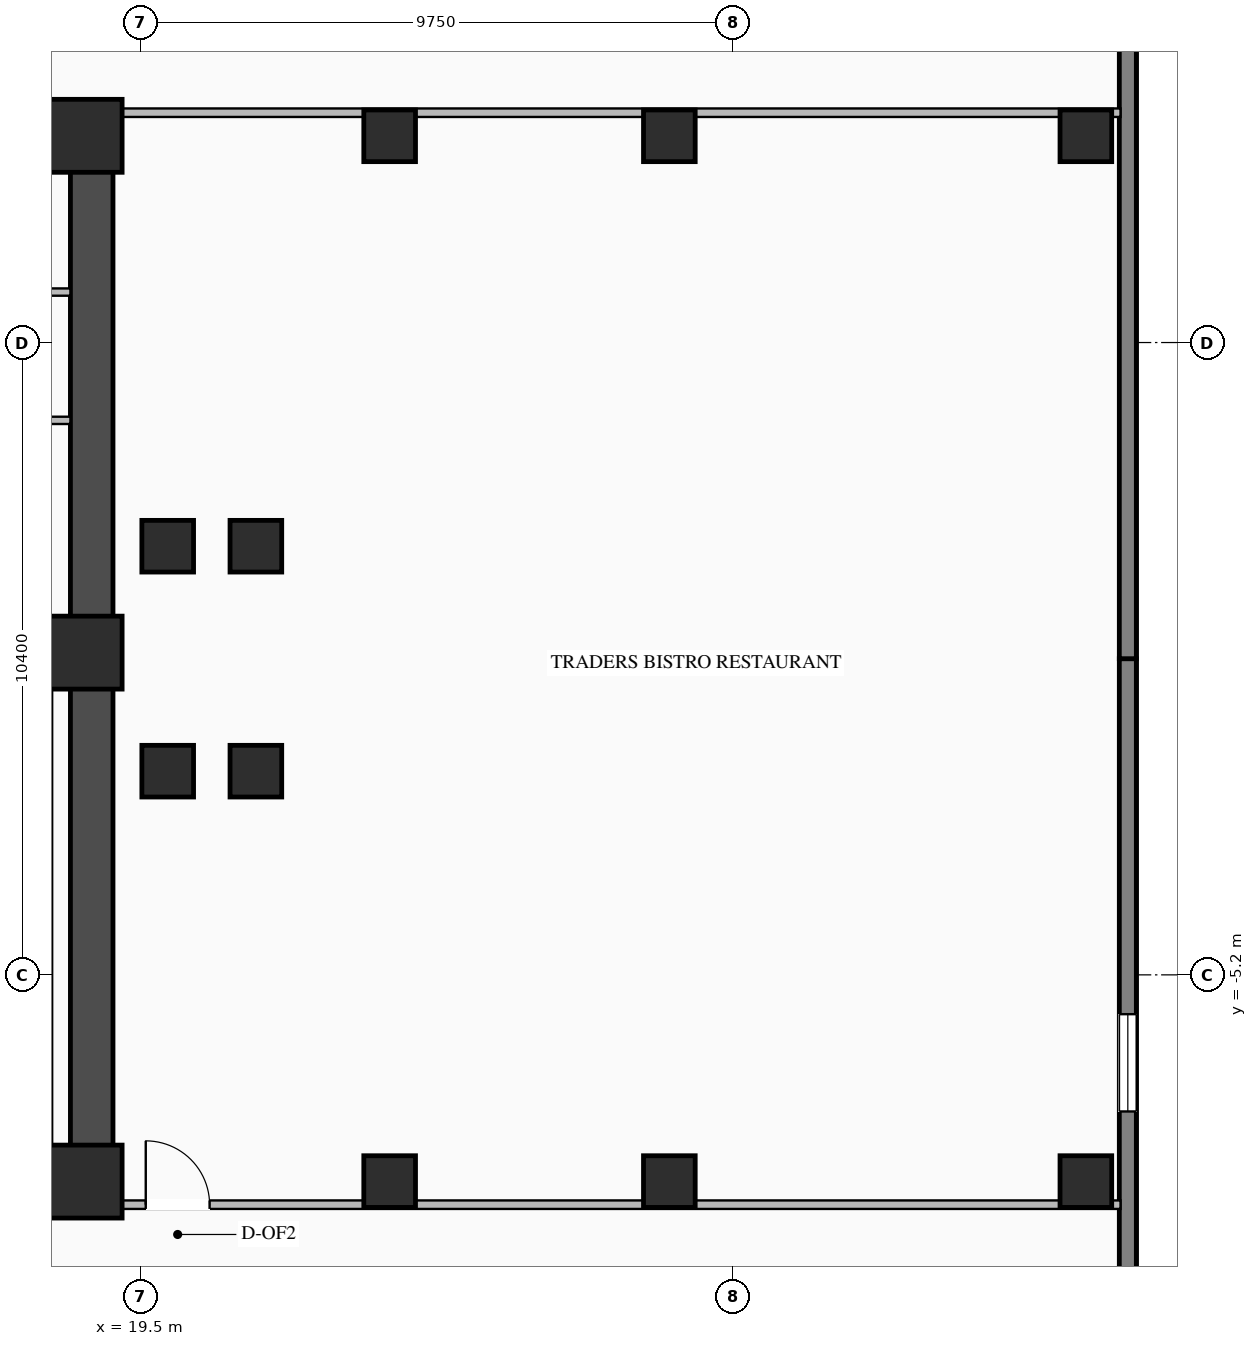
"""IFC4 building model, lengths in metres.
Left out: names, types, materials, properties, quantities, classifications, styles, units other than length and angle.
Written with IfcOpenShell. Run it as: python <this file> out.ifc"""

import sys

from ifc_helpers import new_model, si_unit, direction, frame, frame_2d, origin, origin_2d, place, context, subcontext, project, spatial, rectangle, i_section, extrude, element, fill, save


model = new_model("IFC4")
c1 = context("Model", 3, precision=1e-05, world=origin(), true_north=direction((0.0, 1.0)))
c2 = subcontext(c1, "Body", "Model", "MODEL_VIEW")
j1 = project(units=[si_unit("LENGTHUNIT", "METRE"), si_unit("PLANEANGLEUNIT", "RADIAN")], contexts=[c1])
p1 = place(None, origin())
s1 = spatial("IfcSite", under=j1, at=p1, CompositionType="ELEMENT")
p2 = place(p1, origin())
s2 = spatial("IfcBuilding", under=s1, at=p2, CompositionType="ELEMENT")
p3 = place(p2, frame((0.0, 0.0, 65.7)))
s3 = spatial("IfcBuildingStorey", under=s2, at=p3, CompositionType="ELEMENT", Elevation=65.7)
p4 = place(p3, frame((8.8, -8.7, 0.0), z_axis=(0.0, 0.0, 1.0), x_axis=(1.0, 0.0, 0.0)))
e1 = element("IfcWall", 1, at=p4, inside=s3, PredefinedType="SHEAR", context=c2, shape_type="SweptSolid", body=[
    extrude(rectangle(XDim=10.25, YDim=0.7, at=frame_2d((5.125, 0.0))), origin(), (0.0, 0.0, 1.0), 4.02),
])
p5 = place(p3, frame((8.8, 8.7, 0.0), z_axis=(0.0, 0.0, 1.0), x_axis=(1.0, 0.0, 0.0)))
e2 = element("IfcWall", 2, at=p5, inside=s3, PredefinedType="SHEAR", context=c2, shape_type="SweptSolid", body=[
    extrude(rectangle(XDim=10.25, YDim=0.7, at=frame_2d((5.125, 0.0))), origin(), (0.0, 0.0, 1.0), 4.02),
])
p6 = place(p5, frame((3.25, 0.0, 0.0)))
e3 = element("IfcOpeningElement", 3, at=p6, cuts=e2, PredefinedType="OPENING", context=c2, shape_type="SweptSolid", body=[
    extrude(rectangle(XDim=1.4, YDim=2.05, at=frame_2d((0.7, 1.025))), frame((0.0, 0.36, 0.0), z_axis=(0.0, -1.0, 0.0), x_axis=(1.0, 0.0, 0.0)), (0.0, 0.0, 1.0), 0.72),
])
p7 = place(p3, frame((18.7, -8.35, 0.0), z_axis=(0.0, 0.0, 1.0), x_axis=(0.0, 1.0, 0.0)))
e4 = element("IfcWall", 4, at=p7, inside=s3, PredefinedType="SHEAR", context=c2, shape_type="SweptSolid", body=[
    extrude(rectangle(XDim=16.7, YDim=0.7, at=frame_2d((8.35, 0.0))), origin(), (0.0, 0.0, 1.0), 4.02),
])
for number, where, z_axis, x_axis in (
    (5, (18.6, -8.6, 0.0), (0.0, 0.0, 1.0), (1.0, 0.0, 0.0)),
    (6, (18.6, 0.1, 0.0), (0.0, 0.0, 1.0), (1.0, 0.0, 0.0)),
    (7, (18.6, 8.6, 0.0), (0.0, 0.0, 1.0), (1.0, 0.0, 0.0)),
):
    element("IfcColumn", number, at=place(p3, frame(where, z_axis=z_axis, x_axis=x_axis)), inside=s3, PredefinedType="COLUMN", context=c2, shape_type="SweptSolid", body=[
        extrude(rectangle(XDim=1.2, YDim=1.2, at=origin_2d()), origin(), (0.0, 0.0, 1.0), 4.3),
    ])
for number, where, z_axis, x_axis in (
    (8, (19.95, -1.85, 0.0), (0.0, 0.0, 1.0), (1.0, 0.0, 0.0)),
    (9, (19.95, 1.85, 0.0), (0.0, 0.0, 1.0), (1.0, 0.0, 0.0)),
    (10, (21.4, -1.85, 0.0), (0.0, 0.0, 1.0), (1.0, 0.0, 0.0)),
    (11, (21.4, 1.85, 0.0), (0.0, 0.0, 1.0), (1.0, 0.0, 0.0)),
    (12, (23.6, -8.6, 0.0), (0.0, 0.0, 1.0), (1.0, 0.0, 0.0)),
    (13, (23.6, 8.6, 0.0), (0.0, 0.0, 1.0), (1.0, 0.0, 0.0)),
    (14, (28.2, -8.6, 0.0), (0.0, 0.0, 1.0), (1.0, 0.0, 0.0)),
    (15, (28.2, 8.6, 0.0), (0.0, 0.0, 1.0), (1.0, 0.0, 0.0)),
    (16, (35.05, -8.6, 0.0), (0.0, 0.0, 1.0), (1.0, 0.0, 0.0)),
    (17, (35.05, 8.6, 0.0), (0.0, 0.0, 1.0), (1.0, 0.0, 0.0)),
):
    element("IfcColumn", number, at=place(p3, frame(where, z_axis=z_axis, x_axis=x_axis)), inside=s3, PredefinedType="COLUMN", context=c2, shape_type="SweptSolid", body=[
        extrude(i_section(OverallWidth=0.85, OverallDepth=0.85, WebThickness=0.032, FlangeThickness=0.048, at=origin_2d()), origin(), (0.0, 0.0, 1.0), 4.3),
    ])
p8 = place(p3, frame((35.74, 0.0, 0.0), z_axis=(0.0, 0.0, 1.0), x_axis=(0.0, -1.0, 0.0)))
e18 = element("IfcWall", 18, at=p8, inside=s3, PredefinedType="STANDARD", context=c2, shape_type="SweptSolid", body=[
    extrude(rectangle(XDim=19.94, YDim=0.28, at=frame_2d((9.97, 0.0))), origin(), (0.0, 0.0, 1.0), 4.0),
])
p9 = place(p8, frame((5.847, 0.0, 0.76)))
e19 = element("IfcOpeningElement", 19, at=p9, cuts=e18, PredefinedType="OPENING", context=c2, shape_type="SweptSolid", body=[
    extrude(rectangle(XDim=1.6, YDim=1.95, at=frame_2d((0.8, 0.975))), frame((0.0, 0.15, 0.0), z_axis=(0.0, -1.0, 0.0), x_axis=(1.0, 0.0, 0.0)), (0.0, 0.0, 1.0), 0.3),
])
p10 = place(p3, frame((35.74, 19.94, 0.0), z_axis=(0.0, 0.0, 1.0), x_axis=(0.0, -1.0, 0.0)))
e20 = element("IfcWall", 20, at=p10, inside=s3, PredefinedType="STANDARD", context=c2, shape_type="SweptSolid", body=[
    extrude(rectangle(XDim=19.94, YDim=0.28, at=frame_2d((9.97, 0.0))), origin(), (0.0, 0.0, 1.0), 2.195),
])
p11 = place(p3, frame((13.9, 3.92, 0.0), z_axis=(0.0, 0.0, 1.0), x_axis=(1.0, 0.0, 0.0)))
e21 = element("IfcWall", 21, at=p11, inside=s3, PredefinedType="STANDARD", context=c2, shape_type="SweptSolid", body=[
    extrude(rectangle(XDim=4.45, YDim=0.12, at=frame_2d((2.225, 0.0))), origin(), (0.0, 0.0, 1.0), 4.0),
])
p12 = place(p3, frame((16.15, 6.03, 0.0), z_axis=(0.0, 0.0, 1.0), x_axis=(1.0, 0.0, 0.0)))
e22 = element("IfcWall", 22, at=p12, inside=s3, PredefinedType="STANDARD", context=c2, shape_type="SweptSolid", body=[
    extrude(rectangle(XDim=2.2, YDim=0.12, at=frame_2d((1.1, 0.0))), origin(), (0.0, 0.0, 1.0), 4.0),
])
p13 = place(p3, frame((19.05, 8.98, 0.0), z_axis=(0.0, 0.0, 1.0), x_axis=(1.0, 0.0, 0.0)))
e23 = element("IfcWall", 23, at=p13, inside=s3, PredefinedType="STANDARD", context=c2, shape_type="SweptSolid", body=[
    extrude(rectangle(XDim=16.57, YDim=0.14, at=frame_2d((8.285, 0.0))), origin(), (0.0, 0.0, 1.0), 4.0),
])
p14 = place(p3, frame((19.05, -8.98, 0.0), z_axis=(0.0, 0.0, 1.0), x_axis=(1.0, 0.0, 0.0)))
e24 = element("IfcWall", 24, at=p14, inside=s3, PredefinedType="STANDARD", context=c2, shape_type="SweptSolid", body=[
    extrude(rectangle(XDim=16.57, YDim=0.14, at=frame_2d((8.285, 0.0))), origin(), (0.0, 0.0, 1.0), 4.0),
])
p15 = place(p14, frame((0.539, 0.0, 0.0)))
e25 = element("IfcOpeningElement", 25, at=p15, cuts=e24, PredefinedType="OPENING", context=c2, shape_type="SweptSolid", body=[
    extrude(rectangle(XDim=1.05, YDim=2.08, at=frame_2d((0.525, 1.04))), frame((0.0, 0.08, 0.0), z_axis=(0.0, -1.0, 0.0), x_axis=(1.0, 0.0, 0.0)), (0.0, 0.0, 1.0), 0.16),
])
p16 = place(p9, origin())
e26 = element("IfcWindow", 26, at=p16, inside=s3, PartitioningType="SINGLE_PANEL", PredefinedType="WINDOW", context=c2, shape_type="SweptSolid", body=[
    extrude(rectangle(XDim=1.6, YDim=1.95, at=frame_2d((0.8, 0.975))), frame((0.0, 0.03, 0.0), z_axis=(0.0, -1.0, 0.0), x_axis=(1.0, 0.0, 0.0)), (0.0, 0.0, 1.0), 0.06),
])
fill(e19, e26)
p17 = place(p15, origin())
e27 = element("IfcDoor", 27, at=p17, inside=s3, OperationType="SINGLE_SWING_LEFT", PredefinedType="DOOR", context=c2, shape_type="SweptSolid", body=[
    extrude(rectangle(XDim=1.05, YDim=2.08, at=frame_2d((0.525, 1.04))), frame((0.0, 0.025, 0.0), z_axis=(0.0, -1.0, 0.0), x_axis=(1.0, 0.0, 0.0)), (0.0, 0.0, 1.0), 0.05),
])
fill(e25, e27)
save(model, sys.argv[1])
